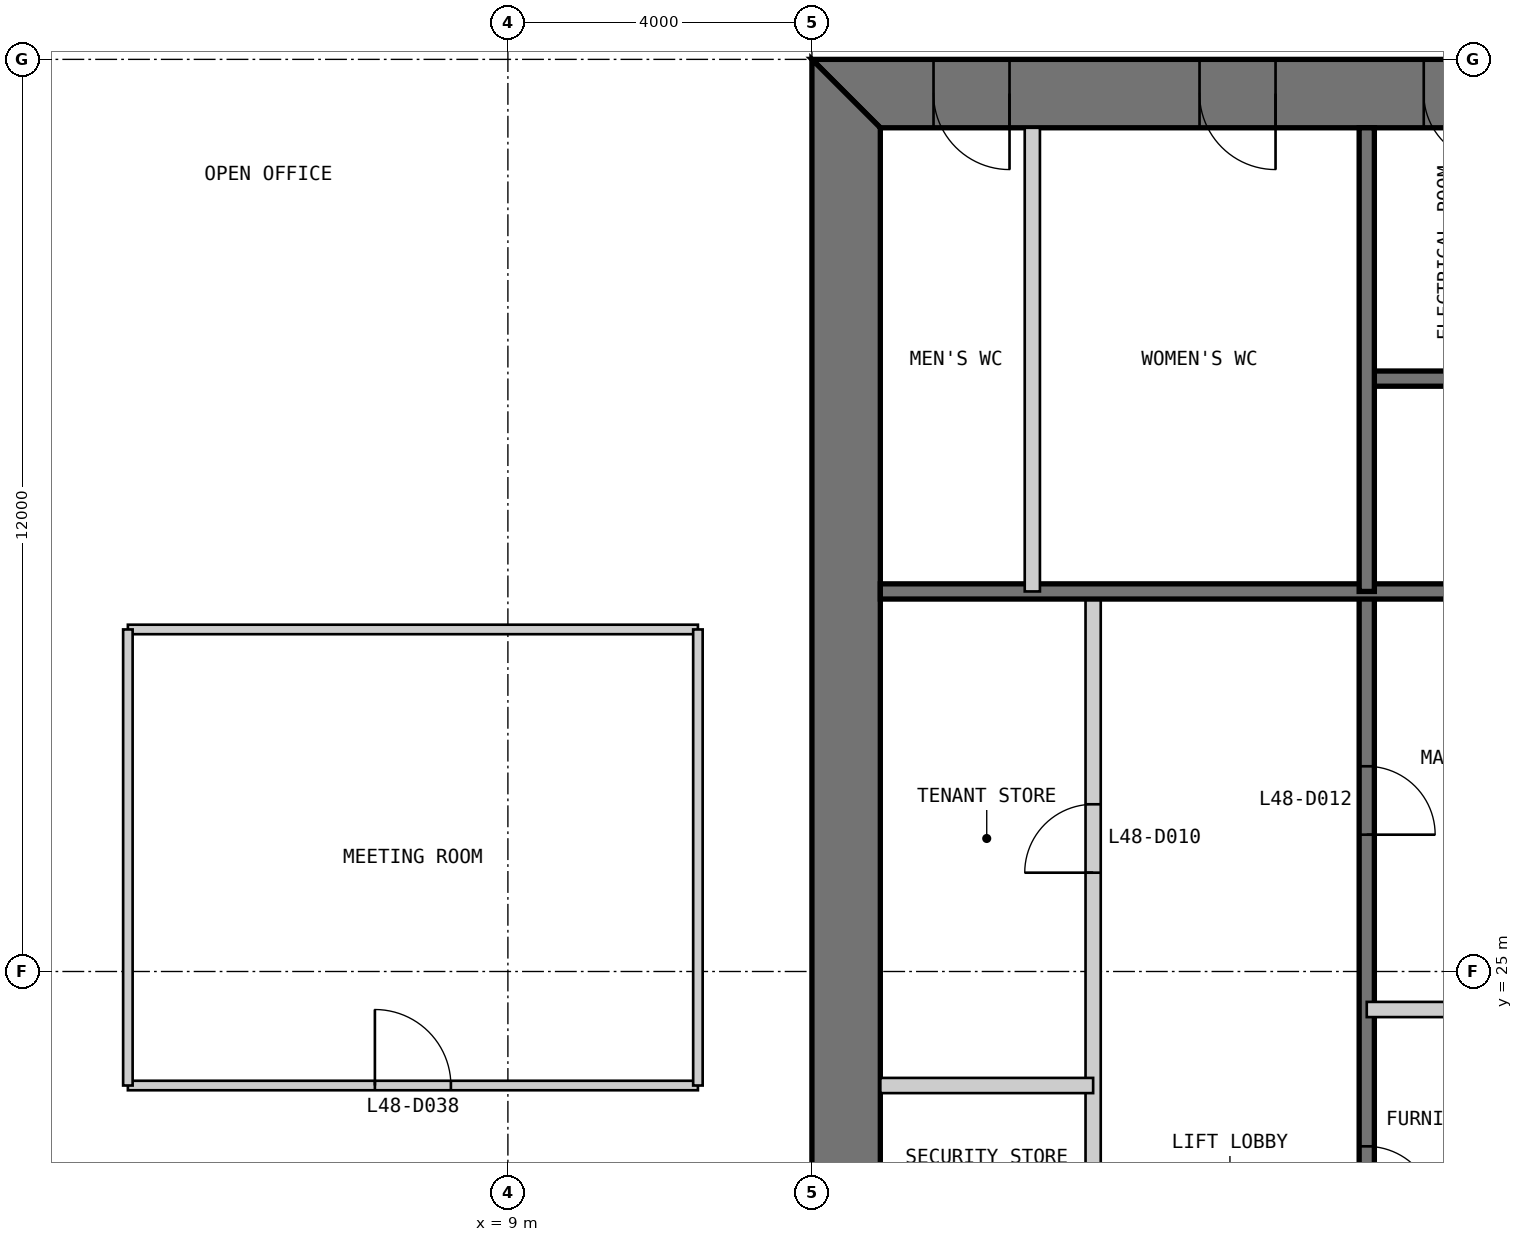
"""IFC4 building model, lengths in metres.
Left out: names, types, materials, properties, quantities, classifications, styles, units other than length and angle.
Written with IfcOpenShell. Run it as: python <this file> out.ifc"""

import sys

from ifc_helpers import new_model, si_unit, direction, frame, frame_2d, origin, place, context, subcontext, project, spatial, polyline, rectangle, outline, extrude, element, fill, save


model = new_model("IFC4")
c1 = context("Model", 3, precision=1e-05, world=origin(), true_north=direction((0.0, 1.0)))
c2 = subcontext(c1, "Body", "Model", "MODEL_VIEW")
j1 = project(units=[si_unit("LENGTHUNIT", "METRE"), si_unit("PLANEANGLEUNIT", "RADIAN")], contexts=[c1])
p1 = place(None, origin())
s1 = spatial("IfcSite", under=j1, at=p1, CompositionType="ELEMENT")
p2 = place(p1, origin())
s2 = spatial("IfcBuilding", under=s1, at=p2, CompositionType="ELEMENT")
p3 = place(p2, frame((0.0, 0.0, 205.8)))
s3 = spatial("IfcBuildingStorey", under=s2, at=p3, CompositionType="ELEMENT", Elevation=205.8)
p4 = place(p3, frame((37.0, 36.55, 0.0), z_axis=(0.0, 0.0, 1.0), x_axis=(-1.0, 0.0, 0.0)))
e1 = element("IfcWall", 1, at=p4, inside=s3, PredefinedType="SHEAR", context=c2, shape_type="SweptSolid", body=[
    extrude(outline(polyline([(0.0, -0.45), (24.0, -0.45), (23.1, 0.45), (0.9, 0.45), (0.0, -0.45)])), origin(), (0.0, 0.0, 1.0), 4.0),
])
p5 = place(p4, frame((4.9, 0.0, 0.0)))
e2 = element("IfcOpeningElement", 2, at=p5, cuts=e1, PredefinedType="OPENING", context=c2, shape_type="SweptSolid", body=[
    extrude(rectangle(XDim=1.0, YDim=2.2, at=frame_2d((0.5, 1.1))), frame((0.0, 0.46, 0.0), z_axis=(0.0, -1.0, 0.0), x_axis=(1.0, 0.0, 0.0)), (0.0, 0.0, 1.0), 0.92),
])
p6 = place(p4, frame((8.9, 0.0, 0.0)))
e3 = element("IfcOpeningElement", 3, at=p6, cuts=e1, PredefinedType="OPENING", context=c2, shape_type="SweptSolid", body=[
    extrude(rectangle(XDim=1.1, YDim=2.2, at=frame_2d((0.55, 1.1))), frame((0.0, 0.46, 0.0), z_axis=(0.0, -1.0, 0.0), x_axis=(1.0, 0.0, 0.0)), (0.0, 0.0, 1.0), 0.92),
])
p7 = place(p4, frame((15.05, 0.0, 0.0)))
e4 = element("IfcOpeningElement", 4, at=p7, cuts=e1, PredefinedType="OPENING", context=c2, shape_type="SweptSolid", body=[
    extrude(rectangle(XDim=0.9, YDim=2.2, at=frame_2d((0.45, 1.1))), frame((0.0, 0.46, 0.0), z_axis=(0.0, -1.0, 0.0), x_axis=(1.0, 0.0, 0.0)), (0.0, 0.0, 1.0), 0.92),
])
p8 = place(p4, frame((17.9, 0.0, 0.0)))
e5 = element("IfcOpeningElement", 5, at=p8, cuts=e1, PredefinedType="OPENING", context=c2, shape_type="SweptSolid", body=[
    extrude(rectangle(XDim=1.0, YDim=2.2, at=frame_2d((0.5, 1.1))), frame((0.0, 0.46, 0.0), z_axis=(0.0, -1.0, 0.0), x_axis=(1.0, 0.0, 0.0)), (0.0, 0.0, 1.0), 0.92),
])
p9 = place(p4, frame((21.4, 0.0, 0.0)))
e6 = element("IfcOpeningElement", 6, at=p9, cuts=e1, PredefinedType="OPENING", context=c2, shape_type="SweptSolid", body=[
    extrude(rectangle(XDim=1.0, YDim=2.2, at=frame_2d((0.5, 1.1))), frame((0.0, 0.46, 0.0), z_axis=(0.0, -1.0, 0.0), x_axis=(1.0, 0.0, 0.0)), (0.0, 0.0, 1.0), 0.92),
])
p10 = place(p3, frame((13.45, 36.1, 0.0), z_axis=(0.0, 0.0, 1.0), x_axis=(0.0, -1.0, 0.0)))
e7 = element("IfcWall", 7, at=p10, inside=s3, PredefinedType="SHEAR", context=c2, shape_type="SweptSolid", body=[
    extrude(outline(polyline([(-0.9, -0.45), (23.1, -0.45), (22.2, 0.45), (0.0, 0.45), (-0.9, -0.45)])), origin(), (0.0, 0.0, 1.0), 4.0),
])
p11 = place(p10, frame((20.2, 0.0, 0.0)))
e8 = element("IfcOpeningElement", 8, at=p11, cuts=e7, PredefinedType="OPENING", context=c2, shape_type="SweptSolid", body=[
    extrude(rectangle(XDim=1.0, YDim=2.2, at=frame_2d((0.5, 1.1))), frame((0.0, 0.46, 0.0), z_axis=(0.0, -1.0, 0.0), x_axis=(1.0, 0.0, 0.0)), (0.0, 0.0, 1.0), 0.92),
])
p12 = place(p10, frame((17.25, 0.0, 0.0)))
e9 = element("IfcOpeningElement", 9, at=p12, cuts=e7, PredefinedType="OPENING", context=c2, shape_type="SweptSolid", body=[
    extrude(rectangle(XDim=0.9, YDim=2.2, at=frame_2d((0.45, 1.1))), frame((0.0, 0.46, 0.0), z_axis=(0.0, -1.0, 0.0), x_axis=(1.0, 0.0, 0.0)), (0.0, 0.0, 1.0), 0.92),
])
p13 = place(p3, frame((16.7, 13.9, 0.0), z_axis=(0.0, 0.0, 1.0), x_axis=(0.0, 1.0, 0.0)))
e10 = element("IfcWall", 10, at=p13, inside=s3, PredefinedType="PARTITIONING", context=c2, shape_type="SweptSolid", body=[
    extrude(rectangle(XDim=16.1, YDim=0.2, at=frame_2d((8.05, 0.0))), origin(), (0.0, 0.0, 1.0), 3.8),
])
p14 = place(p13, frame((7.4, 0.0, 0.0)))
e11 = element("IfcOpeningElement", 11, at=p14, cuts=e10, PredefinedType="OPENING", context=c2, shape_type="SweptSolid", body=[
    extrude(rectangle(XDim=0.9, YDim=2.2, at=frame_2d((0.45, 1.1))), frame((0.0, 0.11, 0.0), z_axis=(0.0, -1.0, 0.0), x_axis=(1.0, 0.0, 0.0)), (0.0, 0.0, 1.0), 0.22),
])
p15 = place(p13, frame((12.4, 0.0, 0.0)))
e12 = element("IfcOpeningElement", 12, at=p15, cuts=e10, PredefinedType="OPENING", context=c2, shape_type="SweptSolid", body=[
    extrude(rectangle(XDim=0.9, YDim=2.2, at=frame_2d((0.45, 1.1))), frame((0.0, 0.11, 0.0), z_axis=(0.0, -1.0, 0.0), x_axis=(1.0, 0.0, 0.0)), (0.0, 0.0, 1.0), 0.22),
])
p16 = place(p3, frame((20.3, 13.9, 0.0), z_axis=(0.0, 0.0, 1.0), x_axis=(0.0, 1.0, 0.0)))
e13 = element("IfcWall", 13, at=p16, inside=s3, PredefinedType="SOLIDWALL", context=c2, shape_type="SweptSolid", body=[
    extrude(rectangle(XDim=16.1, YDim=0.2, at=frame_2d((8.05, 0.0))), origin(), (0.0, 0.0, 1.0), 3.8),
])
p17 = place(p16, frame((7.9, 0.0, 0.0)))
e14 = element("IfcOpeningElement", 14, at=p17, cuts=e13, PredefinedType="OPENING", context=c2, shape_type="SweptSolid", body=[
    extrude(rectangle(XDim=0.9, YDim=2.2, at=frame_2d((0.45, 1.1))), frame((0.0, 0.11, 0.0), z_axis=(0.0, -1.0, 0.0), x_axis=(1.0, 0.0, 0.0)), (0.0, 0.0, 1.0), 0.22),
])
p18 = place(p16, frame((12.9, 0.0, 0.0)))
e15 = element("IfcOpeningElement", 15, at=p18, cuts=e13, PredefinedType="OPENING", context=c2, shape_type="SweptSolid", body=[
    extrude(rectangle(XDim=0.9, YDim=2.2, at=frame_2d((0.45, 1.1))), frame((0.0, 0.11, 0.0), z_axis=(0.0, -1.0, 0.0), x_axis=(1.0, 0.0, 0.0)), (0.0, 0.0, 1.0), 0.22),
])
for number, where, z_axis, x_axis in (
    (16, (13.9, 23.5, 0.0), (0.0, 0.0, 1.0), (1.0, 0.0, 0.0)),
    (17, (20.3, 24.5, 0.0), (0.0, 0.0, 1.0), (1.0, 0.0, 0.0)),
):
    element("IfcWall", number, at=place(p3, frame(where, z_axis=z_axis, x_axis=x_axis)), inside=s3, PredefinedType="PARTITIONING", context=c2, shape_type="SweptSolid", body=[
        extrude(rectangle(XDim=2.8, YDim=0.2, at=frame_2d((1.4, 0.0))), origin(), (0.0, 0.0, 1.0), 3.8),
    ])
p19 = place(p3, frame((29.7, 32.8, 0.0), z_axis=(0.0, 0.0, 1.0), x_axis=(-1.0, 0.0, 0.0)))
e18 = element("IfcWall", 18, at=p19, inside=s3, PredefinedType="SOLIDWALL", context=c2, shape_type="SweptSolid", body=[
    extrude(rectangle(XDim=9.4, YDim=0.2, at=frame_2d((4.7, 0.0))), origin(), (0.0, 0.0, 1.0), 3.8),
])
p20 = place(p19, frame((0.25, 0.0, 0.0)))
e19 = element("IfcOpeningElement", 19, at=p20, cuts=e18, PredefinedType="OPENING", context=c2, shape_type="SweptSolid", body=[
    extrude(rectangle(XDim=1.0, YDim=2.2, at=frame_2d((0.5, 1.1))), frame((0.0, 0.11, 0.0), z_axis=(0.0, -1.0, 0.0), x_axis=(1.0, 0.0, 0.0)), (0.0, 0.0, 1.0), 0.22),
])
p21 = place(p3, frame((29.7, 30.0, 0.0), z_axis=(0.0, 0.0, 1.0), x_axis=(-1.0, 0.0, 0.0)))
e20 = element("IfcWall", 20, at=p21, inside=s3, PredefinedType="SOLIDWALL", context=c2, shape_type="SweptSolid", body=[
    extrude(rectangle(XDim=15.8, YDim=0.2, at=frame_2d((7.9, 0.0))), origin(), (0.0, 0.0, 1.0), 3.8),
])
p22 = place(p3, frame((20.3, 36.1, 0.0), z_axis=(0.0, 0.0, 1.0), x_axis=(0.0, -1.0, 0.0)))
e21 = element("IfcWall", 21, at=p22, inside=s3, PredefinedType="SOLIDWALL", context=c2, shape_type="SweptSolid", body=[
    extrude(rectangle(XDim=6.1, YDim=0.2, at=frame_2d((3.05, 0.0))), origin(), (0.0, 0.0, 1.0), 3.8),
])
p23 = place(p3, frame((15.9, 36.1, 0.0), z_axis=(0.0, 0.0, 1.0), x_axis=(0.0, -1.0, 0.0)))
e22 = element("IfcWall", 22, at=p23, inside=s3, PredefinedType="PARTITIONING", context=c2, shape_type="SweptSolid", body=[
    extrude(rectangle(XDim=6.1, YDim=0.2, at=frame_2d((3.05, 0.0))), origin(), (0.0, 0.0, 1.0), 3.8),
])
p24 = place(p3, frame((4.0, 29.5, 0.0), z_axis=(0.0, 0.0, 1.0), x_axis=(1.0, 0.0, 0.0)))
e23 = element("IfcWall", 23, at=p24, inside=s3, PredefinedType="PARTITIONING", context=c2, shape_type="SweptSolid", body=[
    extrude(rectangle(XDim=7.5, YDim=0.125, at=frame_2d((3.75, 0.0))), origin(), (0.0, 0.0, 1.0), 3.85),
])
p25 = place(p3, frame((4.0, 23.5, 0.0), z_axis=(0.0, 0.0, 1.0), x_axis=(1.0, 0.0, 0.0)))
e24 = element("IfcWall", 24, at=p25, inside=s3, PredefinedType="PARTITIONING", context=c2, shape_type="SweptSolid", body=[
    extrude(rectangle(XDim=7.5, YDim=0.125, at=frame_2d((3.75, 0.0))), origin(), (0.0, 0.0, 1.0), 3.85),
])
p26 = place(p25, frame((3.25, 0.0, 0.0)))
e25 = element("IfcOpeningElement", 25, at=p26, cuts=e24, PredefinedType="OPENING", context=c2, shape_type="SweptSolid", body=[
    extrude(rectangle(XDim=1.0, YDim=2.2, at=frame_2d((0.5, 1.1))), frame((0.0, 0.073, 0.0), z_axis=(0.0, -1.0, 0.0), x_axis=(1.0, 0.0, 0.0)), (0.0, 0.0, 1.0), 0.145),
])
p27 = place(p3, frame((4.0, 29.5, 0.0), z_axis=(0.0, 0.0, 1.0), x_axis=(0.0, -1.0, 0.0)))
e26 = element("IfcWall", 26, at=p27, inside=s3, PredefinedType="PARTITIONING", context=c2, shape_type="SweptSolid", body=[
    extrude(rectangle(XDim=6.0, YDim=0.125, at=frame_2d((3.0, 0.0))), origin(), (0.0, 0.0, 1.0), 3.238),
])
p28 = place(p3, frame((11.5, 29.5, 0.0), z_axis=(0.0, 0.0, 1.0), x_axis=(0.0, -1.0, 0.0)))
e27 = element("IfcWall", 27, at=p28, inside=s3, PredefinedType="PARTITIONING", context=c2, shape_type="SweptSolid", body=[
    extrude(rectangle(XDim=6.0, YDim=0.125, at=frame_2d((3.0, 0.0))), origin(), (0.0, 0.0, 1.0), 3.85),
])
p29 = place(p15, origin())
e28 = element("IfcDoor", 28, at=p29, inside=s3, OperationType="SINGLE_SWING_LEFT", PredefinedType="DOOR", context=c2, shape_type="SweptSolid", body=[
    extrude(rectangle(XDim=0.9, YDim=2.2, at=frame_2d((0.45, 1.1))), frame((0.0, 0.025, 0.0), z_axis=(0.0, -1.0, 0.0), x_axis=(1.0, 0.0, 0.0)), (0.0, 0.0, 1.0), 0.05),
])
fill(e12, e28)
p30 = place(p17, frame((0.9, 0.0, 0.0), z_axis=(0.0, 0.0, 1.0), x_axis=(-1.0, 0.0, 0.0)))
e29 = element("IfcDoor", 29, at=p30, inside=s3, OperationType="SINGLE_SWING_RIGHT", PredefinedType="DOOR", context=c2, shape_type="SweptSolid", body=[
    extrude(rectangle(XDim=0.9, YDim=2.2, at=frame_2d((0.45, 1.1))), frame((0.0, 0.025, 0.0), z_axis=(0.0, -1.0, 0.0), x_axis=(1.0, 0.0, 0.0)), (0.0, 0.0, 1.0), 0.05),
])
fill(e14, e29)
p31 = place(p18, frame((0.9, 0.0, 0.0), z_axis=(0.0, 0.0, 1.0), x_axis=(-1.0, 0.0, 0.0)))
e30 = element("IfcDoor", 30, at=p31, inside=s3, OperationType="SINGLE_SWING_RIGHT", PredefinedType="DOOR", context=c2, shape_type="SweptSolid", body=[
    extrude(rectangle(XDim=0.9, YDim=2.2, at=frame_2d((0.45, 1.1))), frame((0.0, 0.025, 0.0), z_axis=(0.0, -1.0, 0.0), x_axis=(1.0, 0.0, 0.0)), (0.0, 0.0, 1.0), 0.05),
])
fill(e15, e30)
p32 = place(p7, origin())
e31 = element("IfcDoor", 31, at=p32, inside=s3, OperationType="SINGLE_SWING_LEFT", PredefinedType="DOOR", context=c2, shape_type="SweptSolid", body=[
    extrude(rectangle(XDim=0.9, YDim=2.2, at=frame_2d((0.45, 1.1))), frame((0.0, 0.025, 0.0), z_axis=(0.0, -1.0, 0.0), x_axis=(1.0, 0.0, 0.0)), (0.0, 0.0, 1.0), 0.05),
    extrude(outline(polyline([(0.0, 0.0), (0.04, 0.0), (0.04, 2.16), (0.86, 2.16), (0.86, 0.0), (0.9, 0.0), (0.9, 2.2), (0.0, 2.2), (0.0, 0.0)])), frame((0.0, 0.3, 0.0), z_axis=(0.0, -1.0, 0.0), x_axis=(1.0, 0.0, 0.0)), (0.0, 0.0, 1.0), 0.6),
])
fill(e4, e31)
p33 = place(p8, origin())
e32 = element("IfcDoor", 32, at=p33, inside=s3, OperationType="SINGLE_SWING_LEFT", PredefinedType="DOOR", context=c2, shape_type="SweptSolid", body=[
    extrude(rectangle(XDim=1.0, YDim=2.2, at=frame_2d((0.5, 1.1))), frame((0.0, 0.025, 0.0), z_axis=(0.0, -1.0, 0.0), x_axis=(1.0, 0.0, 0.0)), (0.0, 0.0, 1.0), 0.05),
    extrude(outline(polyline([(0.0, 0.0), (0.04, 0.0), (0.04, 2.16), (0.96, 2.16), (0.96, 0.0), (1.0, 0.0), (1.0, 2.2), (0.0, 2.2), (0.0, 0.0)])), frame((0.0, 0.3, 0.0), z_axis=(0.0, -1.0, 0.0), x_axis=(1.0, 0.0, 0.0)), (0.0, 0.0, 1.0), 0.6),
])
fill(e5, e32)
p34 = place(p9, origin())
e33 = element("IfcDoor", 33, at=p34, inside=s3, OperationType="SINGLE_SWING_LEFT", PredefinedType="DOOR", context=c2, shape_type="SweptSolid", body=[
    extrude(rectangle(XDim=1.0, YDim=2.2, at=frame_2d((0.5, 1.1))), frame((0.0, 0.025, 0.0), z_axis=(0.0, -1.0, 0.0), x_axis=(1.0, 0.0, 0.0)), (0.0, 0.0, 1.0), 0.05),
    extrude(outline(polyline([(0.0, 0.0), (0.04, 0.0), (0.04, 2.16), (0.96, 2.16), (0.96, 0.0), (1.0, 0.0), (1.0, 2.2), (0.0, 2.2), (0.0, 0.0)])), frame((0.0, 0.3, 0.0), z_axis=(0.0, -1.0, 0.0), x_axis=(1.0, 0.0, 0.0)), (0.0, 0.0, 1.0), 0.6),
])
fill(e6, e33)
p35 = place(p26, origin())
e34 = element("IfcDoor", 34, at=p35, inside=s3, OperationType="SINGLE_SWING_LEFT", PredefinedType="DOOR", context=c2, shape_type="SweptSolid", body=[
    extrude(rectangle(XDim=1.0, YDim=2.2, at=frame_2d((0.5, 1.1))), frame((0.0, 0.025, 0.0), z_axis=(0.0, -1.0, 0.0), x_axis=(1.0, 0.0, 0.0)), (0.0, 0.0, 1.0), 0.05),
])
fill(e25, e34)
save(model, sys.argv[1])
